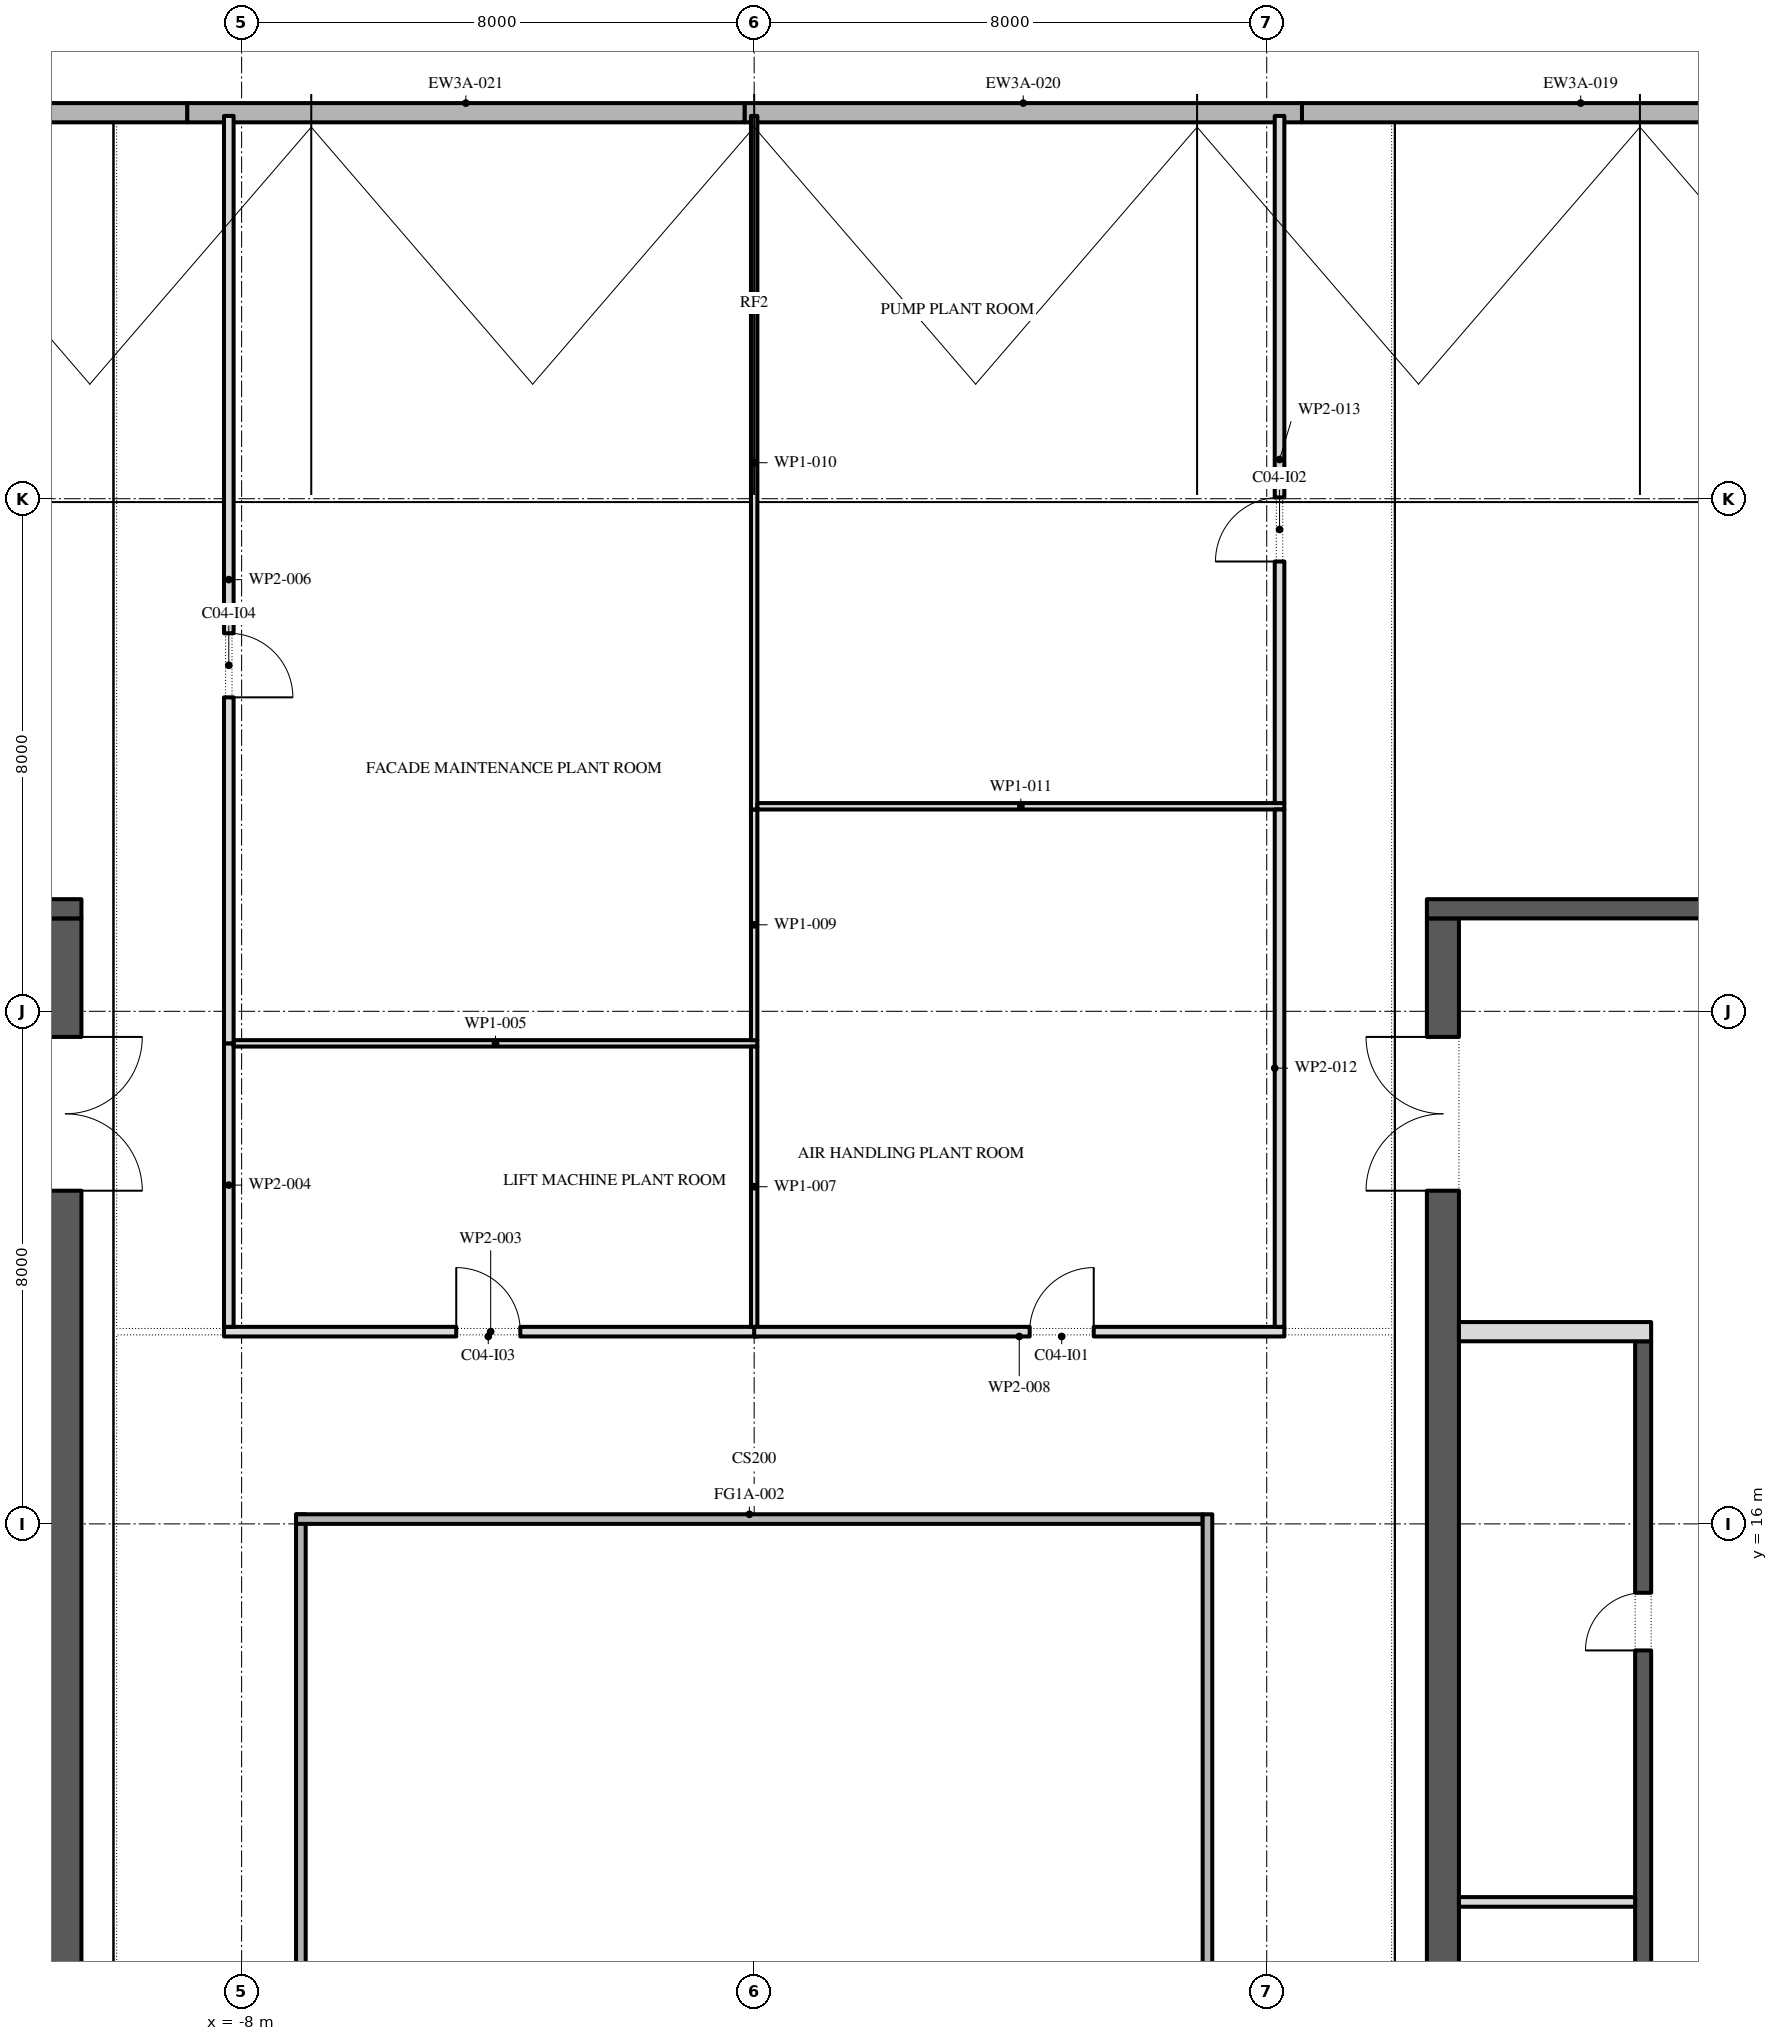
"""IFC4 building model, lengths in metres.
Left out: names, types, materials, properties, quantities, classifications, styles, units other than length and angle.
Written with IfcOpenShell. Run it as: python <this file> out.ifc"""

import sys

from ifc_helpers import new_model, si_unit, direction, frame, frame_2d, origin, place, context, subcontext, project, spatial, rectangle, extrude, element, fill, save


model = new_model("IFC4")
c1 = context("Model", 3, precision=1e-05, world=origin(), true_north=direction((0.0, 1.0)))
c2 = subcontext(c1, "Body", "Model", "MODEL_VIEW")
j1 = project(units=[si_unit("LENGTHUNIT", "METRE"), si_unit("PLANEANGLEUNIT", "RADIAN")], contexts=[c1])
p1 = place(None, origin())
s1 = spatial("IfcSite", under=j1, at=p1, CompositionType="ELEMENT")
p2 = place(p1, origin())
s2 = spatial("IfcBuilding", under=s1, at=p2, CompositionType="ELEMENT")
p3 = place(p2, frame((0.0, 0.0, 381.6)))
s3 = spatial("IfcBuildingStorey", under=s2, at=p3, CompositionType="ELEMENT", Elevation=381.6)
p4 = place(p3, frame((-7.075, -2.15, 0.0), z_axis=(0.0, 0.0, 1.0), x_axis=(0.0, 1.0, 0.0)))
e1 = element("IfcWall", 1, at=p4, inside=s3, PredefinedType="STANDARD", context=c2, shape_type="SweptSolid", body=[
    extrude(rectangle(XDim=18.3, YDim=0.15, at=frame_2d((9.15, 0.0))), origin(), (0.0, 0.0, 1.0), 4.0),
])
p5 = place(p3, frame((-7.15, 16.075, 0.0), z_axis=(0.0, 0.0, 1.0), x_axis=(1.0, 0.0, 0.0)))
e2 = element("IfcWall", 2, at=p5, inside=s3, PredefinedType="STANDARD", context=c2, shape_type="SweptSolid", body=[
    extrude(rectangle(XDim=14.15, YDim=0.15, at=frame_2d((7.075, 0.0))), origin(), (0.0, 0.0, 1.0), 4.0),
])
p6 = place(p3, frame((7.075, 16.15, 0.0), z_axis=(0.0, 0.0, 1.0), x_axis=(0.0, -1.0, 0.0)))
e3 = element("IfcWall", 3, at=p6, inside=s3, PredefinedType="STANDARD", context=c2, shape_type="SweptSolid", body=[
    extrude(rectangle(XDim=18.15, YDim=0.15, at=frame_2d((9.075, 0.0))), origin(), (0.0, 0.0, 1.0), 4.0),
])
for number, where, z_axis, x_axis in (
    (4, (17.25, 38.024, 0.0), (0.0, 0.0, 1.0), (-1.0, 0.0, 0.0)),
    (5, (8.55, 38.024, 0.0), (0.0, 0.0, 1.0), (-1.0, 0.0, 0.0)),
):
    element("IfcWall", number, at=place(p3, frame(where, z_axis=z_axis, x_axis=x_axis)), inside=s3, PredefinedType="STANDARD", context=c2, shape_type="SweptSolid", body=[
        extrude(rectangle(XDim=8.7, YDim=0.3, at=frame_2d((4.35, 0.0))), origin(), (0.0, 0.0, 1.0), 2.199),
    ])
p7 = place(p3, frame((-0.15, 38.024, 0.0), z_axis=(0.0, 0.0, 1.0), x_axis=(-1.0, 0.0, 0.0)))
e6 = element("IfcWall", 6, at=p7, inside=s3, PredefinedType="STANDARD", context=c2, shape_type="SweptSolid", body=[
    extrude(rectangle(XDim=8.7, YDim=0.3, at=frame_2d((4.35, 0.0))), origin(), (0.0, 0.0, 1.0), 2.199),
])
p8 = place(p3, frame((-8.85, 38.024, 0.0), z_axis=(0.0, 0.0, 1.0), x_axis=(-1.0, 0.0, 0.0)))
e7 = element("IfcWall", 7, at=p8, inside=s3, PredefinedType="STANDARD", context=c2, shape_type="SweptSolid", body=[
    extrude(rectangle(XDim=8.7, YDim=0.3, at=frame_2d((4.35, 0.0))), origin(), (0.0, 0.0, 1.0), 2.199),
])
p9 = place(p3, frame((-10.75, -2.45, 0.0), z_axis=(0.0, 0.0, 1.0), x_axis=(0.0, 1.0, 0.0)))
e8 = element("IfcWall", 8, at=p9, inside=s3, PredefinedType="SHEAR", context=c2, shape_type="SweptSolid", body=[
    extrude(rectangle(XDim=27.9, YDim=0.5, at=frame_2d((13.95, 0.0))), origin(), (0.0, 0.0, 1.0), 4.0),
])
p10 = place(p9, frame((23.65, 0.0, 0.0)))
e9 = element("IfcOpeningElement", 9, at=p10, cuts=e8, PredefinedType="OPENING", context=c2, shape_type="SweptSolid", body=[
    extrude(rectangle(XDim=2.4, YDim=2.1, at=frame_2d((1.2, 1.05))), frame((0.0, 0.26, 0.0), z_axis=(0.0, -1.0, 0.0), x_axis=(1.0, 0.0, 0.0)), (0.0, 0.0, 1.0), 0.52),
])
p11 = place(p9, frame((1.087, 0.0, 0.0)))
e10 = element("IfcOpeningElement", 10, at=p11, cuts=e8, PredefinedType="OPENING", context=c2, shape_type="SweptSolid", body=[
    extrude(rectangle(XDim=0.9, YDim=2.1, at=frame_2d((0.45, 1.05))), frame((0.0, 0.26, 0.0), z_axis=(0.0, -1.0, 0.0), x_axis=(1.0, 0.0, 0.0)), (0.0, 0.0, 1.0), 0.52),
])
p12 = place(p9, frame((4.262, 0.0, 0.0)))
e11 = element("IfcOpeningElement", 11, at=p12, cuts=e8, PredefinedType="OPENING", context=c2, shape_type="SweptSolid", body=[
    extrude(rectangle(XDim=1.0, YDim=2.1, at=frame_2d((0.5, 1.05))), frame((0.0, 0.26, 0.0), z_axis=(0.0, -1.0, 0.0), x_axis=(1.0, 0.0, 0.0)), (0.0, 0.0, 1.0), 0.52),
])
p13 = place(p3, frame((-21.5, 25.6, 0.0), z_axis=(0.0, 0.0, 1.0), x_axis=(1.0, 0.0, 0.0)))
e12 = element("IfcWall", 12, at=p13, inside=s3, PredefinedType="SHEAR", context=c2, shape_type="SweptSolid", body=[
    extrude(rectangle(XDim=11.0, YDim=0.3, at=frame_2d((5.5, 0.0))), origin(), (0.0, 0.0, 1.0), 4.0),
])
p14 = place(p3, frame((10.75, -2.45, 0.0), z_axis=(0.0, 0.0, 1.0), x_axis=(0.0, 1.0, 0.0)))
e13 = element("IfcWall", 13, at=p14, inside=s3, PredefinedType="SHEAR", context=c2, shape_type="SweptSolid", body=[
    extrude(rectangle(XDim=27.9, YDim=0.5, at=frame_2d((13.95, 0.0))), origin(), (0.0, 0.0, 1.0), 4.0),
])
p15 = place(p14, frame((23.65, 0.0, 0.0)))
e14 = element("IfcOpeningElement", 14, at=p15, cuts=e13, PredefinedType="OPENING", context=c2, shape_type="SweptSolid", body=[
    extrude(rectangle(XDim=2.4, YDim=2.1, at=frame_2d((1.2, 1.05))), frame((0.0, 0.26, 0.0), z_axis=(0.0, -1.0, 0.0), x_axis=(1.0, 0.0, 0.0)), (0.0, 0.0, 1.0), 0.52),
])
p16 = place(p14, frame((1.087, 0.0, 0.0)))
e15 = element("IfcOpeningElement", 15, at=p16, cuts=e13, PredefinedType="OPENING", context=c2, shape_type="SweptSolid", body=[
    extrude(rectangle(XDim=0.9, YDim=2.1, at=frame_2d((0.45, 1.05))), frame((0.0, 0.26, 0.0), z_axis=(0.0, -1.0, 0.0), x_axis=(1.0, 0.0, 0.0)), (0.0, 0.0, 1.0), 0.52),
])
p17 = place(p14, frame((4.262, 0.0, 0.0)))
e16 = element("IfcOpeningElement", 16, at=p17, cuts=e13, PredefinedType="OPENING", context=c2, shape_type="SweptSolid", body=[
    extrude(rectangle(XDim=1.0, YDim=2.1, at=frame_2d((0.5, 1.05))), frame((0.0, 0.26, 0.0), z_axis=(0.0, -1.0, 0.0), x_axis=(1.0, 0.0, 0.0)), (0.0, 0.0, 1.0), 0.52),
])
p18 = place(p3, frame((10.5, 25.6, 0.0), z_axis=(0.0, 0.0, 1.0), x_axis=(1.0, 0.0, 0.0)))
e17 = element("IfcWall", 17, at=p18, inside=s3, PredefinedType="SHEAR", context=c2, shape_type="SweptSolid", body=[
    extrude(rectangle(XDim=11.0, YDim=0.3, at=frame_2d((5.5, 0.0))), origin(), (0.0, 0.0, 1.0), 4.0),
])
p19 = place(p3, frame((13.875, -2.45, 0.0), z_axis=(0.0, 0.0, 1.0), x_axis=(0.0, 1.0, 0.0)))
e18 = element("IfcWall", 18, at=p19, inside=s3, PredefinedType="SHEAR", context=c2, shape_type="SweptSolid", body=[
    extrude(rectangle(XDim=21.3, YDim=0.25, at=frame_2d((10.65, 0.0))), origin(), (0.0, 0.0, 1.0), 4.0),
])
p20 = place(p19, frame((10.196, 0.0, 0.0)))
e19 = element("IfcOpeningElement", 19, at=p20, cuts=e18, PredefinedType="OPENING", context=c2, shape_type="SweptSolid", body=[
    extrude(rectangle(XDim=0.9, YDim=2.1, at=frame_2d((0.45, 1.05))), frame((0.0, 0.135, 0.0), z_axis=(0.0, -1.0, 0.0), x_axis=(1.0, 0.0, 0.0)), (0.0, 0.0, 1.0), 0.27),
])
p21 = place(p19, frame((16.475, 0.0, 0.0)))
e20 = element("IfcOpeningElement", 20, at=p21, cuts=e18, PredefinedType="OPENING", context=c2, shape_type="SweptSolid", body=[
    extrude(rectangle(XDim=0.9, YDim=2.1, at=frame_2d((0.45, 1.05))), frame((0.0, 0.135, 0.0), z_axis=(0.0, -1.0, 0.0), x_axis=(1.0, 0.0, 0.0)), (0.0, 0.0, 1.0), 0.27),
])
p22 = place(p19, frame((6.971, 0.0, 0.0)))
e21 = element("IfcOpeningElement", 21, at=p22, cuts=e18, PredefinedType="OPENING", context=c2, shape_type="SweptSolid", body=[
    extrude(rectangle(XDim=1.1, YDim=2.1, at=frame_2d((0.55, 1.05))), frame((0.0, 0.135, 0.0), z_axis=(0.0, -1.0, 0.0), x_axis=(1.0, 0.0, 0.0)), (0.0, 0.0, 1.0), 0.27),
])
p23 = place(p3, frame((11.0, 19.0, 0.0), z_axis=(0.0, 0.0, 1.0), x_axis=(1.0, 0.0, 0.0)))
e22 = element("IfcWall", 22, at=p23, inside=s3, PredefinedType="PARTITIONING", context=c2, shape_type="SweptSolid", body=[
    extrude(rectangle(XDim=3.0, YDim=0.3, at=frame_2d((1.5, 0.0))), origin(), (0.0, 0.0, 1.0), 4.0),
])
p24 = place(p3, frame((11.0, 10.1, 0.0), z_axis=(0.0, 0.0, 1.0), x_axis=(1.0, 0.0, 0.0)))
e23 = element("IfcWall", 23, at=p24, inside=s3, PredefinedType="PARTITIONING", context=c2, shape_type="SweptSolid", body=[
    extrude(rectangle(XDim=2.75, YDim=0.15, at=frame_2d((1.375, 0.0))), origin(), (0.0, 0.0, 1.0), 4.0),
])
p25 = place(p3, frame((-8.275, 19.0, 0.0), z_axis=(0.0, 0.0, 1.0), x_axis=(1.0, 0.0, 0.0)))
e24 = element("IfcWall", 24, at=p25, inside=s3, PredefinedType="PARTITIONING", context=c2, shape_type="SweptSolid", body=[
    extrude(rectangle(XDim=8.325, YDim=0.15, at=frame_2d((4.163, 0.0))), origin(), (0.0, 0.0, 1.0), 4.0),
])
p26 = place(p25, frame((3.625, 0.0, 0.0)))
e25 = element("IfcOpeningElement", 25, at=p26, cuts=e24, PredefinedType="OPENING", context=c2, shape_type="SweptSolid", body=[
    extrude(rectangle(XDim=1.0, YDim=2.1, at=frame_2d((0.5, 1.05))), frame((0.0, 0.085, 0.0), z_axis=(0.0, -1.0, 0.0), x_axis=(1.0, 0.0, 0.0)), (0.0, 0.0, 1.0), 0.17),
])
p27 = place(p3, frame((-8.2, 23.5, 0.0), z_axis=(0.0, 0.0, 1.0), x_axis=(0.0, -1.0, 0.0)))
e26 = element("IfcWall", 26, at=p27, inside=s3, PredefinedType="PARTITIONING", context=c2, shape_type="SweptSolid", body=[
    extrude(rectangle(XDim=4.425, YDim=0.15, at=frame_2d((2.212, 0.0))), origin(), (0.0, 0.0, 1.0), 4.0),
])
p28 = place(p3, frame((-8.125, 23.5, 0.0), z_axis=(0.0, 0.0, 1.0), x_axis=(1.0, 0.0, 0.0)))
e27 = element("IfcWall", 27, at=p28, inside=s3, PredefinedType="PARTITIONING", context=c2, shape_type="SweptSolid", body=[
    extrude(rectangle(XDim=8.175, YDim=0.1, at=frame_2d((4.087, 0.0))), origin(), (0.0, 0.0, 1.0), 4.0),
])
p29 = place(p3, frame((-8.2, 37.974, 0.0), z_axis=(0.0, 0.0, 1.0), x_axis=(0.0, -1.0, 0.0)))
e28 = element("IfcWall", 28, at=p29, inside=s3, PredefinedType="PARTITIONING", context=c2, shape_type="SweptSolid", body=[
    extrude(rectangle(XDim=14.474, YDim=0.15, at=frame_2d((7.237, 0.0))), origin(), (0.0, 0.0, 1.0), 4.0),
])
p30 = place(p29, frame((8.074, 0.0, 0.0)))
e29 = element("IfcOpeningElement", 29, at=p30, cuts=e28, PredefinedType="OPENING", context=c2, shape_type="SweptSolid", body=[
    extrude(rectangle(XDim=1.0, YDim=2.1, at=frame_2d((0.5, 1.05))), frame((0.0, 0.085, 0.0), z_axis=(0.0, -1.0, 0.0), x_axis=(1.0, 0.0, 0.0)), (0.0, 0.0, 1.0), 0.17),
])
p31 = place(p3, frame((0.0, 19.075, 0.0), z_axis=(0.0, 0.0, 1.0), x_axis=(0.0, 1.0, 0.0)))
e30 = element("IfcWall", 30, at=p31, inside=s3, PredefinedType="PARTITIONING", context=c2, shape_type="SweptSolid", body=[
    extrude(rectangle(XDim=4.375, YDim=0.1, at=frame_2d((2.188, 0.0))), origin(), (0.0, 0.0, 1.0), 4.0),
])
p32 = place(p3, frame((0.0, 19.0, 0.0), z_axis=(0.0, 0.0, 1.0), x_axis=(1.0, 0.0, 0.0)))
e31 = element("IfcWall", 31, at=p32, inside=s3, PredefinedType="PARTITIONING", context=c2, shape_type="SweptSolid", body=[
    extrude(rectangle(XDim=8.275, YDim=0.15, at=frame_2d((4.137, 0.0))), origin(), (0.0, 0.0, 1.0), 4.0),
])
p33 = place(p32, frame((4.3, 0.0, 0.0)))
e32 = element("IfcOpeningElement", 32, at=p33, cuts=e31, PredefinedType="OPENING", context=c2, shape_type="SweptSolid", body=[
    extrude(rectangle(XDim=1.0, YDim=2.1, at=frame_2d((0.5, 1.05))), frame((0.0, 0.085, 0.0), z_axis=(0.0, -1.0, 0.0), x_axis=(1.0, 0.0, 0.0)), (0.0, 0.0, 1.0), 0.17),
])
p34 = place(p3, frame((0.0, 23.55, 0.0), z_axis=(0.0, 0.0, 1.0), x_axis=(0.0, 1.0, 0.0)))
e33 = element("IfcWall", 33, at=p34, inside=s3, PredefinedType="PARTITIONING", context=c2, shape_type="SweptSolid", body=[
    extrude(rectangle(XDim=3.6, YDim=0.1, at=frame_2d((1.8, 0.0))), origin(), (0.0, 0.0, 1.0), 4.0),
])
p35 = place(p3, frame((0.0, 27.15, 0.0), z_axis=(0.0, 0.0, 1.0), x_axis=(0.0, 1.0, 0.0)))
e34 = element("IfcWall", 34, at=p35, inside=s3, PredefinedType="PARTITIONING", context=c2, shape_type="SweptSolid", body=[
    extrude(rectangle(XDim=10.824, YDim=0.1, at=frame_2d((5.412, 0.0))), origin(), (0.0, 0.0, 1.0), 4.0),
])
p36 = place(p3, frame((0.05, 27.2, 0.0), z_axis=(0.0, 0.0, 1.0), x_axis=(1.0, 0.0, 0.0)))
e35 = element("IfcWall", 35, at=p36, inside=s3, PredefinedType="PARTITIONING", context=c2, shape_type="SweptSolid", body=[
    extrude(rectangle(XDim=8.225, YDim=0.1, at=frame_2d((4.112, 0.0))), origin(), (0.0, 0.0, 1.0), 4.0),
])
p37 = place(p3, frame((8.2, 19.075, 0.0), z_axis=(0.0, 0.0, 1.0), x_axis=(0.0, 1.0, 0.0)))
e36 = element("IfcWall", 36, at=p37, inside=s3, PredefinedType="PARTITIONING", context=c2, shape_type="SweptSolid", body=[
    extrude(rectangle(XDim=8.075, YDim=0.15, at=frame_2d((4.038, 0.0))), origin(), (0.0, 0.0, 1.0), 4.0),
])
p38 = place(p3, frame((8.2, 27.25, 0.0), z_axis=(0.0, 0.0, 1.0), x_axis=(0.0, 1.0, 0.0)))
e37 = element("IfcWall", 37, at=p38, inside=s3, PredefinedType="PARTITIONING", context=c2, shape_type="SweptSolid", body=[
    extrude(rectangle(XDim=10.724, YDim=0.15, at=frame_2d((5.362, 0.0))), origin(), (0.0, 0.0, 1.0), 4.0),
])
p39 = place(p38, frame((3.77, 0.0, 0.0)))
e38 = element("IfcOpeningElement", 38, at=p39, cuts=e37, PredefinedType="OPENING", context=c2, shape_type="SweptSolid", body=[
    extrude(rectangle(XDim=1.0, YDim=2.1, at=frame_2d((0.5, 1.05))), frame((0.0, 0.085, 0.0), z_axis=(0.0, -1.0, 0.0), x_axis=(1.0, 0.0, 0.0)), (0.0, 0.0, 1.0), 0.17),
])
p40 = place(p10, frame((2.4, 0.0, 0.0), z_axis=(0.0, 0.0, 1.0), x_axis=(-1.0, 0.0, 0.0)))
e39 = element("IfcDoor", 39, at=p40, inside=s3, OperationType="DOUBLE_DOOR_SINGLE_SWING", PredefinedType="DOOR", context=c2, shape_type="SweptSolid", body=[
    extrude(rectangle(XDim=2.4, YDim=2.1, at=frame_2d((1.2, 1.05))), frame((0.0, 0.025, 0.0), z_axis=(0.0, -1.0, 0.0), x_axis=(1.0, 0.0, 0.0)), (0.0, 0.0, 1.0), 0.05),
])
fill(e9, e39)
p41 = place(p21, origin())
e40 = element("IfcDoor", 40, at=p41, inside=s3, OperationType="SINGLE_SWING_RIGHT", PredefinedType="DOOR", context=c2, shape_type="SweptSolid", body=[
    extrude(rectangle(XDim=0.9, YDim=2.1, at=frame_2d((0.45, 1.05))), frame((0.0, 0.125, 0.0), z_axis=(0.0, -1.0, 0.0), x_axis=(1.0, 0.0, 0.0)), (0.0, 0.0, 1.0), 0.05),
])
fill(e20, e40)
p42 = place(p15, origin())
e41 = element("IfcDoor", 41, at=p42, inside=s3, OperationType="DOUBLE_DOOR_SINGLE_SWING", PredefinedType="DOOR", context=c2, shape_type="SweptSolid", body=[
    extrude(rectangle(XDim=2.4, YDim=2.1, at=frame_2d((1.2, 1.05))), frame((0.0, 0.025, 0.0), z_axis=(0.0, -1.0, 0.0), x_axis=(1.0, 0.0, 0.0)), (0.0, 0.0, 1.0), 0.05),
])
fill(e14, e41)
p43 = place(p33, origin())
e42 = element("IfcDoor", 42, at=p43, inside=s3, OperationType="SINGLE_SWING_LEFT", PredefinedType="DOOR", context=c2, shape_type="SweptSolid", body=[
    extrude(rectangle(XDim=1.0, YDim=2.1, at=frame_2d((0.5, 1.05))), frame((0.0, 0.025, 0.0), z_axis=(0.0, -1.0, 0.0), x_axis=(1.0, 0.0, 0.0)), (0.0, 0.0, 1.0), 0.05),
])
fill(e32, e42)
p44 = place(p39, origin())
e43 = element("IfcDoor", 43, at=p44, inside=s3, OperationType="SINGLE_SWING_RIGHT", PredefinedType="DOOR", context=c2, shape_type="SweptSolid", body=[
    extrude(rectangle(XDim=1.0, YDim=2.1, at=frame_2d((0.5, 1.05))), frame((0.0, 0.025, 0.0), z_axis=(0.0, -1.0, 0.0), x_axis=(1.0, 0.0, 0.0)), (0.0, 0.0, 1.0), 0.05),
])
fill(e38, e43)
p45 = place(p26, origin())
e44 = element("IfcDoor", 44, at=p45, inside=s3, OperationType="SINGLE_SWING_RIGHT", PredefinedType="DOOR", context=c2, shape_type="SweptSolid", body=[
    extrude(rectangle(XDim=1.0, YDim=2.1, at=frame_2d((0.5, 1.05))), frame((0.0, 0.025, 0.0), z_axis=(0.0, -1.0, 0.0), x_axis=(1.0, 0.0, 0.0)), (0.0, 0.0, 1.0), 0.05),
])
fill(e25, e44)
p46 = place(p30, origin())
e45 = element("IfcDoor", 45, at=p46, inside=s3, OperationType="SINGLE_SWING_LEFT", PredefinedType="DOOR", context=c2, shape_type="SweptSolid", body=[
    extrude(rectangle(XDim=1.0, YDim=2.1, at=frame_2d((0.5, 1.05))), frame((0.0, 0.025, 0.0), z_axis=(0.0, -1.0, 0.0), x_axis=(1.0, 0.0, 0.0)), (0.0, 0.0, 1.0), 0.05),
])
fill(e29, e45)
save(model, sys.argv[1])
